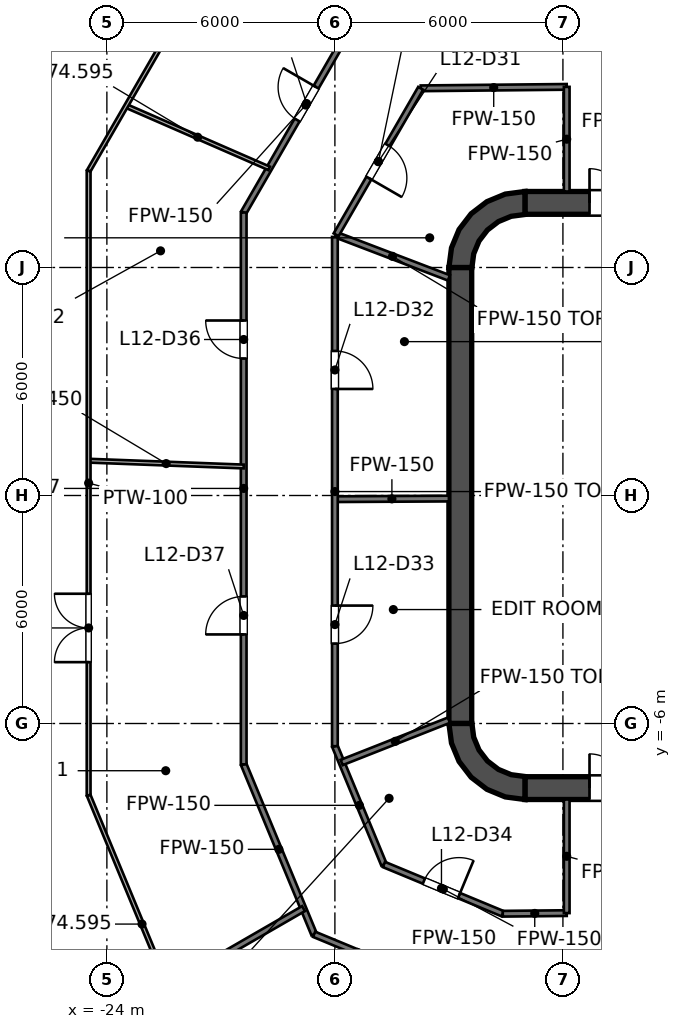
"""IFC4 building model, lengths in metres.
Left out: names, types, materials, properties, quantities, classifications, styles, units other than length and angle.
Written with IfcOpenShell. Run it as: python <this file> out.ifc"""

import sys

from ifc_helpers import new_model, si_unit, direction, frame, frame_2d, origin, place, context, subcontext, project, spatial, polyline, rectangle, outline, extrude, element, fill, save


model = new_model("IFC4")
c1 = context("Model", 3, precision=1e-05, world=origin(), true_north=direction((0.0, 1.0)))
c2 = subcontext(c1, "Body", "Model", "MODEL_VIEW")
j1 = project(units=[si_unit("LENGTHUNIT", "METRE"), si_unit("PLANEANGLEUNIT", "RADIAN")], contexts=[c1])
p1 = place(None, origin())
s1 = spatial("IfcSite", under=j1, at=p1, CompositionType="ELEMENT")
p2 = place(p1, origin())
s2 = spatial("IfcBuilding", under=s1, at=p2, CompositionType="ELEMENT")
p3 = place(p2, frame((0.0, 0.0, 71.4)))
s3 = spatial("IfcBuildingStorey", under=s2, at=p3, CompositionType="ELEMENT", Elevation=71.4)
p4 = place(p3, frame((-13.0, 7.7, 0.0), z_axis=(0.0, 0.0, 1.0), x_axis=(1.0, 0.0, 0.0)))
e1 = element("IfcWall", 1, at=p4, inside=s3, PredefinedType="SHEAR", context=c2, shape_type="SweptSolid", body=[
    extrude(rectangle(XDim=26.0, YDim=0.6, at=frame_2d((13.0, 0.0))), origin(), (0.0, 0.0, 1.0), 4.2),
])
p5 = place(p4, frame((1.7, 0.0, 0.0)))
e2 = element("IfcOpeningElement", 2, at=p5, cuts=e1, PredefinedType="OPENING", context=c2, shape_type="SweptSolid", body=[
    extrude(rectangle(XDim=1.8, YDim=2.1, at=frame_2d((0.9, 1.05))), frame((0.0, 0.3, 0.0), z_axis=(0.0, -1.0, 0.0), x_axis=(1.0, 0.0, 0.0)), (0.0, 0.0, 1.0), 0.6),
])
p6 = place(p4, frame((22.5, 0.0, 0.0)))
e3 = element("IfcOpeningElement", 3, at=p6, cuts=e1, PredefinedType="OPENING", context=c2, shape_type="SweptSolid", body=[
    extrude(rectangle(XDim=1.8, YDim=2.1, at=frame_2d((0.9, 1.05))), frame((0.0, 0.3, 0.0), z_axis=(0.0, -1.0, 0.0), x_axis=(1.0, 0.0, 0.0)), (0.0, 0.0, 1.0), 0.6),
])
p7 = place(p3, frame((-13.0, -7.7, 0.0), z_axis=(0.0, 0.0, 1.0), x_axis=(1.0, 0.0, 0.0)))
e4 = element("IfcWall", 4, at=p7, inside=s3, PredefinedType="SHEAR", context=c2, shape_type="SweptSolid", body=[
    extrude(rectangle(XDim=26.0, YDim=0.6, at=frame_2d((13.0, 0.0))), origin(), (0.0, 0.0, 1.0), 4.2),
])
p8 = place(p7, frame((1.7, 0.0, 0.0)))
e5 = element("IfcOpeningElement", 5, at=p8, cuts=e4, PredefinedType="OPENING", context=c2, shape_type="SweptSolid", body=[
    extrude(rectangle(XDim=1.8, YDim=2.1, at=frame_2d((0.9, 1.05))), frame((0.0, 0.3, 0.0), z_axis=(0.0, -1.0, 0.0), x_axis=(1.0, 0.0, 0.0)), (0.0, 0.0, 1.0), 0.6),
])
p9 = place(p7, frame((22.5, 0.0, 0.0)))
e6 = element("IfcOpeningElement", 6, at=p9, cuts=e4, PredefinedType="OPENING", context=c2, shape_type="SweptSolid", body=[
    extrude(rectangle(XDim=1.8, YDim=2.1, at=frame_2d((0.9, 1.05))), frame((0.0, 0.3, 0.0), z_axis=(0.0, -1.0, 0.0), x_axis=(1.0, 0.0, 0.0)), (0.0, 0.0, 1.0), 0.6),
])
p10 = place(p3, frame((-14.7, -6.0, 0.0), z_axis=(0.0, 0.0, 1.0), x_axis=(0.0, 1.0, 0.0)))
e7 = element("IfcWall", 7, at=p10, inside=s3, PredefinedType="SHEAR", context=c2, shape_type="SweptSolid", body=[
    extrude(rectangle(XDim=12.0, YDim=0.6, at=frame_2d((6.0, 0.0))), origin(), (0.0, 0.0, 1.0), 4.2),
])
p11 = place(p3, origin())
e8 = element("IfcWall", 8, at=p11, inside=s3, PredefinedType="SHEAR", context=c2, shape_type="SweptSolid", body=[
    extrude(outline(polyline([(-15.0, 6.0), (-14.395, 6.0), (-14.347, 6.361), (-14.208, 6.698), (-13.986, 6.986), (-13.698, 7.208), (-13.361, 7.347), (-13.0, 7.395), (-13.0, 8.0), (-13.518, 7.932), (-14.0, 7.732), (-14.414, 7.414), (-14.732, 7.0), (-14.932, 6.518), (-15.0, 6.0)])), origin(), (0.0, 0.0, 1.0), 4.2),
])
e9 = element("IfcWall", 9, at=p11, inside=s3, PredefinedType="SHEAR", context=c2, shape_type="SweptSolid", body=[
    extrude(outline(polyline([(-13.0, -8.0), (-13.0, -7.395), (-13.361, -7.347), (-13.698, -7.208), (-13.986, -6.986), (-14.208, -6.698), (-14.347, -6.361), (-14.395, -6.0), (-15.0, -6.0), (-14.932, -6.518), (-14.732, -7.0), (-14.414, -7.414), (-14.0, -7.732), (-13.518, -7.932), (-13.0, -8.0)])), origin(), (0.0, 0.0, 1.0), 4.2),
])
p12 = place(p3, frame((-11.8, -7.4, 0.0), z_axis=(0.0, 0.0, 1.0), x_axis=(0.0, 1.0, 0.0)))
e10 = element("IfcWall", 10, at=p12, inside=s3, PredefinedType="SOLIDWALL", context=c2, shape_type="SweptSolid", body=[
    extrude(rectangle(XDim=14.8, YDim=0.4, at=frame_2d((7.4, 0.0))), origin(), (0.0, 0.0, 1.0), 4.05),
])
p13 = place(p12, frame((11.2, 0.0, 0.0)))
e11 = element("IfcOpeningElement", 11, at=p13, cuts=e10, PredefinedType="OPENING", context=c2, shape_type="SweptSolid", body=[
    extrude(rectangle(XDim=1.1, YDim=2.1, at=frame_2d((0.55, 1.05))), frame((0.0, 0.2, 0.0), z_axis=(0.0, -1.0, 0.0), x_axis=(1.0, 0.0, 0.0)), (0.0, 0.0, 1.0), 0.4),
])
p14 = place(p12, frame((8.3, 0.0, 0.0)))
e12 = element("IfcOpeningElement", 12, at=p14, cuts=e10, PredefinedType="OPENING", context=c2, shape_type="SweptSolid", body=[
    extrude(rectangle(XDim=1.1, YDim=2.1, at=frame_2d((0.55, 1.05))), frame((0.0, 0.2, 0.0), z_axis=(0.0, -1.0, 0.0), x_axis=(1.0, 0.0, 0.0)), (0.0, 0.0, 1.0), 0.4),
])
p15 = place(p12, frame((5.4, 0.0, 0.0)))
e13 = element("IfcOpeningElement", 13, at=p15, cuts=e10, PredefinedType="OPENING", context=c2, shape_type="SweptSolid", body=[
    extrude(rectangle(XDim=1.1, YDim=2.1, at=frame_2d((0.55, 1.05))), frame((0.0, 0.2, 0.0), z_axis=(0.0, -1.0, 0.0), x_axis=(1.0, 0.0, 0.0)), (0.0, 0.0, 1.0), 0.4),
])
p16 = place(p12, frame((13.552, 0.0, 0.0)))
e14 = element("IfcOpeningElement", 14, at=p16, cuts=e10, PredefinedType="OPENING", context=c2, shape_type="SweptSolid", body=[
    extrude(rectangle(XDim=0.9, YDim=2.1, at=frame_2d((0.45, 1.05))), frame((0.0, 0.2, 0.0), z_axis=(0.0, -1.0, 0.0), x_axis=(1.0, 0.0, 0.0)), (0.0, 0.0, 1.0), 0.4),
])
p17 = place(p12, frame((0.347, 0.0, 0.0)))
e15 = element("IfcOpeningElement", 15, at=p17, cuts=e10, PredefinedType="OPENING", context=c2, shape_type="SweptSolid", body=[
    extrude(rectangle(XDim=0.9, YDim=2.1, at=frame_2d((0.45, 1.05))), frame((0.0, 0.2, 0.0), z_axis=(0.0, -1.0, 0.0), x_axis=(1.0, 0.0, 0.0)), (0.0, 0.0, 1.0), 0.4),
])
e16 = element("IfcWall", 16, at=p11, inside=s3, PredefinedType="SOLIDWALL", context=c2, shape_type="SweptSolid", body=[
    extrude(outline(polyline([(-12.0, -5.925), (-12.0, -5.675), (-14.15, -5.675), (-14.15, -3.025), (-12.0, -3.025), (-12.0, -2.775), (-14.15, -2.775), (-14.15, -0.125), (-12.0, -0.125), (-12.0, 0.125), (-14.15, 0.125), (-14.15, 2.775), (-12.0, 2.775), (-12.0, 3.025), (-14.15, 3.025), (-14.15, 5.675), (-12.0, 5.675), (-12.0, 5.925), (-14.15, 5.925), (-14.4, 5.925), (-14.4, 5.675), (-14.4, 3.025), (-14.4, 2.775), (-14.4, 0.125), (-14.4, -0.125), (-14.4, -2.775), (-14.4, -3.025), (-14.4, -5.675), (-14.4, -5.925), (-14.15, -5.925), (-12.0, -5.925)])), origin(), (0.0, 0.0, 1.0), 4.05),
])
p18 = place(p3, frame((-20.4, -7.075, 0.0), z_axis=(0.0, 0.0, 1.0), x_axis=(0.382745247328, -0.923853925492, 0.0)))
e17 = element("IfcWall", 17, at=p18, inside=s3, PredefinedType="PARTITIONING", context=c2, shape_type="SweptSolid", body=[
    extrude(rectangle(XDim=4.841, YDim=0.15, at=frame_2d((2.42, 0.0))), origin(), (0.0, 0.0, 1.0), 3.195),
])
p19 = place(p3, frame((-18.0, -6.597, 0.0), z_axis=(0.0, 0.0, 1.0), x_axis=(0.382742094492, -0.923855231681, 0.0)))
e18 = element("IfcWall", 18, at=p19, inside=s3, PredefinedType="PARTITIONING", context=c2, shape_type="SweptSolid", body=[
    extrude(rectangle(XDim=3.37, YDim=0.15, at=frame_2d((1.685, 0.0))), origin(), (0.0, 0.0, 1.0), 3.195),
])
p20 = place(p3, frame((-18.547, -11.547, 0.0), z_axis=(0.0, 0.0, 1.0), x_axis=(0.923816952651, -0.382834478587, 0.0)))
e19 = element("IfcWall", 19, at=p20, inside=s3, PredefinedType="PARTITIONING", context=c2, shape_type="SweptSolid", body=[
    extrude(rectangle(XDim=4.869, YDim=0.15, at=frame_2d((2.435, 0.0))), origin(), (0.0, 0.0, 1.0), 3.195),
])
p21 = place(p20, frame((1.207, 0.0, 0.0)))
e20 = element("IfcOpeningElement", 20, at=p21, cuts=e19, PredefinedType="OPENING", context=c2, shape_type="SweptSolid", body=[
    extrude(rectangle(XDim=1.0, YDim=2.1, at=frame_2d((0.5, 1.05))), frame((0.0, 0.075, 0.0), z_axis=(0.0, -1.0, 0.0), x_axis=(1.0, 0.0, 0.0)), (0.0, 0.0, 1.0), 0.15),
])
p22 = place(p3, frame((-16.71, -9.71, 0.0), z_axis=(0.0, 0.0, 1.0), x_axis=(0.923809320732, -0.382852894632, 0.0)))
e21 = element("IfcWall", 21, at=p22, inside=s3, PredefinedType="PARTITIONING", context=c2, shape_type="SweptSolid", body=[
    extrude(rectangle(XDim=3.385, YDim=0.15, at=frame_2d((1.692, 0.0))), origin(), (0.0, 0.0, 1.0), 3.195),
])
p23 = place(p22, frame((1.139, 0.0, 0.0)))
e22 = element("IfcOpeningElement", 22, at=p23, cuts=e21, PredefinedType="OPENING", context=c2, shape_type="SweptSolid", body=[
    extrude(rectangle(XDim=1.0, YDim=2.1, at=frame_2d((0.5, 1.05))), frame((0.0, 0.075, 0.0), z_axis=(0.0, -1.0, 0.0), x_axis=(1.0, 0.0, 0.0)), (0.0, 0.0, 1.0), 0.15),
])
p24 = place(p3, frame((-17.968, 6.86, 0.0), z_axis=(0.0, 0.0, 1.0), x_axis=(0.934237940374, -0.356650348053, 0.0)))
e23 = element("IfcWall", 23, at=p24, inside=s3, PredefinedType="PARTITIONING", context=c2, shape_type="SweptSolid", body=[
    extrude(rectangle(XDim=3.177, YDim=0.15, at=frame_2d((1.588, 0.0))), origin(), (0.0, 0.0, 1.0), 4.05),
])
p25 = place(p3, frame((-18.0, -0.097, 0.0), z_axis=(0.0, 0.0, 1.0), x_axis=(0.999985575988, 0.005371016277, 0.0)))
e24 = element("IfcWall", 24, at=p25, inside=s3, PredefinedType="PARTITIONING", context=c2, shape_type="SweptSolid", body=[
    extrude(rectangle(XDim=3.0, YDim=0.15, at=frame_2d((1.5, 0.0))), origin(), (0.0, 0.0, 1.0), 3.195),
])
p26 = place(p3, frame((-13.583, -11.006, 0.0), z_axis=(0.0, 0.0, 1.0), x_axis=(0.999949916693, 0.010008201951, 0.0)))
e25 = element("IfcWall", 25, at=p26, inside=s3, PredefinedType="PARTITIONING", context=c2, shape_type="SweptSolid", body=[
    extrude(rectangle(XDim=1.683, YDim=0.15, at=frame_2d((0.842, 0.0))), origin(), (0.0, 0.0, 1.0), 4.05),
])
p27 = place(p3, frame((-15.742, 10.715, 0.0), z_axis=(0.0, 0.0, 1.0), x_axis=(0.999950870391, 0.009912456998, 0.0)))
e26 = element("IfcWall", 26, at=p27, inside=s3, PredefinedType="PARTITIONING", context=c2, shape_type="SweptSolid", body=[
    extrude(rectangle(XDim=3.842, YDim=0.15, at=frame_2d((1.921, 0.0))), origin(), (0.0, 0.0, 1.0), 3.195),
])
p28 = place(p3, frame((-17.822, -7.026, 0.0), z_axis=(0.0, 0.0, 1.0), x_axis=(0.930286083334, 0.366834844522, 0.0)))
e27 = element("IfcWall", 27, at=p28, inside=s3, PredefinedType="PARTITIONING", context=c2, shape_type="SweptSolid", body=[
    extrude(rectangle(XDim=3.033, YDim=0.15, at=frame_2d((1.517, 0.0))), origin(), (0.0, 0.0, 1.0), 4.05),
])
p29 = place(p3, frame((-24.703, -14.263, 0.0), z_axis=(0.0, 0.0, 1.0), x_axis=(0.866084930914, 0.499896881811, 0.0)))
e28 = element("IfcWall", 28, at=p29, inside=s3, PredefinedType="PARTITIONING", context=c2, shape_type="SweptSolid", body=[
    extrude(rectangle(XDim=6.785, YDim=0.15, at=frame_2d((3.393, 0.0))), origin(), (0.0, 0.0, 1.0), 3.352),
])
p30 = place(p3, frame((-17.968, 6.86, 0.0), z_axis=(0.0, 0.0, 1.0), x_axis=(0.499985160367, 0.866033971281, 0.0)))
e29 = element("IfcWall", 29, at=p30, inside=s3, PredefinedType="PARTITIONING", context=c2, shape_type="SweptSolid", body=[
    extrude(rectangle(XDim=4.451, YDim=0.15, at=frame_2d((2.226, 0.0))), origin(), (0.0, 0.0, 1.0), 3.195),
])
p31 = place(p30, frame((1.724, 0.0, 0.0)))
e30 = element("IfcOpeningElement", 30, at=p31, cuts=e29, PredefinedType="OPENING", context=c2, shape_type="SweptSolid", body=[
    extrude(rectangle(XDim=1.0, YDim=2.1, at=frame_2d((0.5, 1.05))), frame((0.0, 0.075, 0.0), z_axis=(0.0, -1.0, 0.0), x_axis=(1.0, 0.0, 0.0)), (0.0, 0.0, 1.0), 0.15),
])
p32 = place(p3, frame((-20.4, 7.447, 0.0), z_axis=(0.0, 0.0, 1.0), x_axis=(0.499959831567, 0.866048593798, 0.0)))
e31 = element("IfcWall", 31, at=p32, inside=s3, PredefinedType="PARTITIONING", context=c2, shape_type="SweptSolid", body=[
    extrude(rectangle(XDim=6.529, YDim=0.15, at=frame_2d((3.264, 0.0))), origin(), (0.0, 0.0, 1.0), 3.195),
])
p33 = place(p32, frame((2.811, 0.0, 0.0)))
e32 = element("IfcOpeningElement", 32, at=p33, cuts=e31, PredefinedType="OPENING", context=c2, shape_type="SweptSolid", body=[
    extrude(rectangle(XDim=1.0, YDim=2.1, at=frame_2d((0.5, 1.05))), frame((0.0, 0.075, 0.0), z_axis=(0.0, -1.0, 0.0), x_axis=(1.0, 0.0, 0.0)), (0.0, 0.0, 1.0), 0.15),
])
p34 = place(p3, frame((-11.9, -10.989, 0.0), z_axis=(0.0, 0.0, 1.0), x_axis=(0.0, 1.0, 0.0)))
e33 = element("IfcWall", 33, at=p34, inside=s3, PredefinedType="PARTITIONING", context=c2, shape_type="SweptSolid", body=[
    extrude(rectangle(XDim=2.989, YDim=0.15, at=frame_2d((1.495, 0.0))), origin(), (0.0, 0.0, 1.0), 3.195),
])
p35 = place(p3, frame((-11.9, 8.0, 0.0), z_axis=(0.0, 0.0, 1.0), x_axis=(0.0, 1.0, 0.0)))
e34 = element("IfcWall", 34, at=p35, inside=s3, PredefinedType="PARTITIONING", context=c2, shape_type="SweptSolid", body=[
    extrude(rectangle(XDim=2.753, YDim=0.15, at=frame_2d((1.376, 0.0))), origin(), (0.0, 0.0, 1.0), 3.195),
])
p36 = place(p3, frame((-18.0, -6.597, 0.0), z_axis=(0.0, 0.0, 1.0), x_axis=(0.0, 1.0, 0.0)))
e35 = element("IfcWall", 35, at=p36, inside=s3, PredefinedType="PARTITIONING", context=c2, shape_type="SweptSolid", body=[
    extrude(rectangle(XDim=13.401, YDim=0.15, at=frame_2d((6.7, 0.0))), origin(), (0.0, 0.0, 1.0), 3.127),
])
p37 = place(p36, frame((9.4, 0.0, 0.0)))
e36 = element("IfcOpeningElement", 36, at=p37, cuts=e35, PredefinedType="OPENING", context=c2, shape_type="SweptSolid", body=[
    extrude(rectangle(XDim=1.0, YDim=2.1, at=frame_2d((0.5, 1.05))), frame((0.0, 0.075, 0.0), z_axis=(0.0, -1.0, 0.0), x_axis=(1.0, 0.0, 0.0)), (0.0, 0.0, 1.0), 0.15),
])
p38 = place(p36, frame((2.7, 0.0, 0.0)))
e37 = element("IfcOpeningElement", 37, at=p38, cuts=e35, PredefinedType="OPENING", context=c2, shape_type="SweptSolid", body=[
    extrude(rectangle(XDim=1.0, YDim=2.1, at=frame_2d((0.5, 1.05))), frame((0.0, 0.075, 0.0), z_axis=(0.0, -1.0, 0.0), x_axis=(1.0, 0.0, 0.0)), (0.0, 0.0, 1.0), 0.15),
])
p39 = place(p3, frame((-20.4, -7.075, 0.0), z_axis=(0.0, 0.0, 1.0), x_axis=(0.0, 1.0, 0.0)))
e38 = element("IfcWall", 38, at=p39, inside=s3, PredefinedType="PARTITIONING", context=c2, shape_type="SweptSolid", body=[
    extrude(rectangle(XDim=14.522, YDim=0.15, at=frame_2d((7.261, 0.0))), origin(), (0.0, 0.0, 1.0), 3.127),
])
p40 = place(p39, frame((10.68, 0.0, 0.0)))
e39 = element("IfcOpeningElement", 39, at=p40, cuts=e38, PredefinedType="OPENING", context=c2, shape_type="SweptSolid", body=[
    extrude(rectangle(XDim=1.0, YDim=2.1, at=frame_2d((0.5, 1.05))), frame((0.0, 0.075, 0.0), z_axis=(0.0, -1.0, 0.0), x_axis=(1.0, 0.0, 0.0)), (0.0, 0.0, 1.0), 0.15),
])
p41 = place(p39, frame((3.419, 0.0, 0.0)))
e40 = element("IfcOpeningElement", 40, at=p41, cuts=e38, PredefinedType="OPENING", context=c2, shape_type="SweptSolid", body=[
    extrude(rectangle(XDim=1.0, YDim=2.1, at=frame_2d((0.5, 1.05))), frame((0.0, 0.075, 0.0), z_axis=(0.0, -1.0, 0.0), x_axis=(1.0, 0.0, 0.0)), (0.0, 0.0, 1.0), 0.15),
])
p42 = place(p3, frame((-24.48, -7.887, 0.0), z_axis=(0.0, 0.0, 1.0), x_axis=(0.382715997849, -0.923866042774, 0.0)))
e41 = element("IfcWall", 41, at=p42, inside=s3, PredefinedType="PARTITIONING", context=c2, shape_type="SweptSolid", body=[
    extrude(rectangle(XDim=7.341, YDim=0.1, at=frame_2d((3.67, 0.0))), origin(), (0.0, 0.0, 1.0), 3.195),
])
p43 = place(p3, frame((-23.493, 10.25, 0.0), z_axis=(0.0, 0.0, 1.0), x_axis=(0.916532244419, -0.399960804254, 0.0)))
e42 = element("IfcWall", 42, at=p43, inside=s3, PredefinedType="PARTITIONING", context=c2, shape_type="SweptSolid", body=[
    extrude(rectangle(XDim=4.106, YDim=0.1, at=frame_2d((2.053, 0.0))), origin(), (0.0, 0.0, 1.0), 3.195),
])
p44 = place(p3, frame((-24.48, 0.916, 0.0), z_axis=(0.0, 0.0, 1.0), x_axis=(0.999296943798, -0.037491573945, 0.0)))
e43 = element("IfcWall", 43, at=p44, inside=s3, PredefinedType="PARTITIONING", context=c2, shape_type="SweptSolid", body=[
    extrude(rectangle(XDim=4.083, YDim=0.1, at=frame_2d((2.042, 0.0))), origin(), (0.0, 0.0, 1.0), 4.05),
])
p45 = place(p3, frame((-24.48, 8.54, 0.0), z_axis=(0.0, 0.0, 1.0), x_axis=(0.499991453095, 0.866030338286, 0.0)))
e44 = element("IfcWall", 44, at=p45, inside=s3, PredefinedType="PARTITIONING", context=c2, shape_type="SweptSolid", body=[
    extrude(rectangle(XDim=9.951, YDim=0.1, at=frame_2d((4.976, 0.0))), origin(), (0.0, 0.0, 1.0), 3.195),
])
p46 = place(p3, frame((-24.48, -7.887, 0.0), z_axis=(0.0, 0.0, 1.0), x_axis=(0.0, 1.0, 0.0)))
e45 = element("IfcWall", 45, at=p46, inside=s3, PredefinedType="PARTITIONING", context=c2, shape_type="SweptSolid", body=[
    extrude(rectangle(XDim=16.427, YDim=0.1, at=frame_2d((8.213, 0.0))), origin(), (0.0, 0.0, 1.0), 3.127),
])
p47 = place(p46, frame((3.501, 0.0, 0.0)))
e46 = element("IfcOpeningElement", 46, at=p47, cuts=e45, PredefinedType="OPENING", context=c2, shape_type="SweptSolid", body=[
    extrude(rectangle(XDim=1.8, YDim=2.1, at=frame_2d((0.9, 1.05))), frame((0.0, 0.05, 0.0), z_axis=(0.0, -1.0, 0.0), x_axis=(1.0, 0.0, 0.0)), (0.0, 0.0, 1.0), 0.1),
])
p48 = place(p13, origin())
e47 = element("IfcDoor", 47, at=p48, inside=s3, OperationType="DOUBLE_DOOR_SLIDING", PredefinedType="DOOR", context=c2, shape_type="SweptSolid", body=[
    extrude(rectangle(XDim=1.1, YDim=2.1, at=frame_2d((0.55, 1.05))), frame((0.0, 0.025, 0.0), z_axis=(0.0, -1.0, 0.0), x_axis=(1.0, 0.0, 0.0)), (0.0, 0.0, 1.0), 0.05),
])
fill(e11, e47)
p49 = place(p14, origin())
e48 = element("IfcDoor", 48, at=p49, inside=s3, OperationType="DOUBLE_DOOR_SLIDING", PredefinedType="DOOR", context=c2, shape_type="SweptSolid", body=[
    extrude(rectangle(XDim=1.1, YDim=2.1, at=frame_2d((0.55, 1.05))), frame((0.0, 0.025, 0.0), z_axis=(0.0, -1.0, 0.0), x_axis=(1.0, 0.0, 0.0)), (0.0, 0.0, 1.0), 0.05),
])
fill(e12, e48)
p50 = place(p15, origin())
e49 = element("IfcDoor", 49, at=p50, inside=s3, OperationType="DOUBLE_DOOR_SLIDING", PredefinedType="DOOR", context=c2, shape_type="SweptSolid", body=[
    extrude(rectangle(XDim=1.1, YDim=2.1, at=frame_2d((0.55, 1.05))), frame((0.0, 0.025, 0.0), z_axis=(0.0, -1.0, 0.0), x_axis=(1.0, 0.0, 0.0)), (0.0, 0.0, 1.0), 0.05),
])
fill(e13, e49)
p51 = place(p16, origin())
e50 = element("IfcDoor", 50, at=p51, inside=s3, OperationType="SINGLE_SWING_LEFT", PredefinedType="DOOR", context=c2, shape_type="SweptSolid", body=[
    extrude(rectangle(XDim=0.9, YDim=2.1, at=frame_2d((0.45, 1.05))), frame((0.0, 0.025, 0.0), z_axis=(0.0, -1.0, 0.0), x_axis=(1.0, 0.0, 0.0)), (0.0, 0.0, 1.0), 0.05),
])
fill(e14, e50)
p52 = place(p17, origin())
e51 = element("IfcDoor", 51, at=p52, inside=s3, OperationType="SINGLE_SWING_LEFT", PredefinedType="DOOR", context=c2, shape_type="SweptSolid", body=[
    extrude(rectangle(XDim=0.9, YDim=2.1, at=frame_2d((0.45, 1.05))), frame((0.0, 0.025, 0.0), z_axis=(0.0, -1.0, 0.0), x_axis=(1.0, 0.0, 0.0)), (0.0, 0.0, 1.0), 0.05),
])
fill(e15, e51)
p53 = place(p5, origin())
e52 = element("IfcDoor", 52, at=p53, inside=s3, OperationType="DOUBLE_DOOR_SINGLE_SWING", PredefinedType="DOOR", context=c2, shape_type="SweptSolid", body=[
    extrude(rectangle(XDim=1.8, YDim=2.1, at=frame_2d((0.9, 1.05))), frame((0.0, 0.025, 0.0), z_axis=(0.0, -1.0, 0.0), x_axis=(1.0, 0.0, 0.0)), (0.0, 0.0, 1.0), 0.05),
])
fill(e2, e52)
p54 = place(p8, origin())
e53 = element("IfcDoor", 53, at=p54, inside=s3, OperationType="DOUBLE_DOOR_SINGLE_SWING", PredefinedType="DOOR", context=c2, shape_type="SweptSolid", body=[
    extrude(rectangle(XDim=1.8, YDim=2.1, at=frame_2d((0.9, 1.05))), frame((0.0, 0.025, 0.0), z_axis=(0.0, -1.0, 0.0), x_axis=(1.0, 0.0, 0.0)), (0.0, 0.0, 1.0), 0.05),
])
fill(e5, e53)
p55 = place(p31, origin())
e54 = element("IfcDoor", 54, at=p55, inside=s3, OperationType="SINGLE_SWING_LEFT", PredefinedType="DOOR", context=c2, shape_type="SweptSolid", body=[
    extrude(rectangle(XDim=1.0, YDim=2.1, at=frame_2d((0.5, 1.05))), frame((0.0, 0.025, 0.0), z_axis=(0.0, -1.0, 0.0), x_axis=(1.0, 0.0, 0.0)), (0.0, 0.0, 1.0), 0.05),
])
fill(e30, e54)
p56 = place(p37, origin())
e55 = element("IfcDoor", 55, at=p56, inside=s3, OperationType="SINGLE_SWING_LEFT", PredefinedType="DOOR", context=c2, shape_type="SweptSolid", body=[
    extrude(rectangle(XDim=1.0, YDim=2.1, at=frame_2d((0.5, 1.05))), frame((0.0, 0.025, 0.0), z_axis=(0.0, -1.0, 0.0), x_axis=(1.0, 0.0, 0.0)), (0.0, 0.0, 1.0), 0.05),
])
fill(e36, e55)
p57 = place(p38, origin())
e56 = element("IfcDoor", 56, at=p57, inside=s3, OperationType="SINGLE_SWING_RIGHT", PredefinedType="DOOR", context=c2, shape_type="SweptSolid", body=[
    extrude(rectangle(XDim=1.0, YDim=2.1, at=frame_2d((0.5, 1.05))), frame((0.0, 0.025, 0.0), z_axis=(0.0, -1.0, 0.0), x_axis=(1.0, 0.0, 0.0)), (0.0, 0.0, 1.0), 0.05),
])
fill(e37, e56)
p58 = place(p23, origin())
e57 = element("IfcDoor", 57, at=p58, inside=s3, OperationType="SINGLE_SWING_RIGHT", PredefinedType="DOOR", context=c2, shape_type="SweptSolid", body=[
    extrude(rectangle(XDim=1.0, YDim=2.1, at=frame_2d((0.5, 1.05))), frame((0.0, 0.025, 0.0), z_axis=(0.0, -1.0, 0.0), x_axis=(1.0, 0.0, 0.0)), (0.0, 0.0, 1.0), 0.05),
])
fill(e22, e57)
p59 = place(p33, origin())
e58 = element("IfcDoor", 58, at=p59, inside=s3, OperationType="SINGLE_SWING_RIGHT", PredefinedType="DOOR", context=c2, shape_type="SweptSolid", body=[
    extrude(rectangle(XDim=1.0, YDim=2.1, at=frame_2d((0.5, 1.05))), frame((0.0, 0.025, 0.0), z_axis=(0.0, -1.0, 0.0), x_axis=(1.0, 0.0, 0.0)), (0.0, 0.0, 1.0), 0.05),
])
fill(e32, e58)
p60 = place(p40, origin())
e59 = element("IfcDoor", 59, at=p60, inside=s3, OperationType="SINGLE_SWING_RIGHT", PredefinedType="DOOR", context=c2, shape_type="SweptSolid", body=[
    extrude(rectangle(XDim=1.0, YDim=2.1, at=frame_2d((0.5, 1.05))), frame((0.0, 0.025, 0.0), z_axis=(0.0, -1.0, 0.0), x_axis=(1.0, 0.0, 0.0)), (0.0, 0.0, 1.0), 0.05),
])
fill(e39, e59)
p61 = place(p41, origin())
e60 = element("IfcDoor", 60, at=p61, inside=s3, OperationType="SINGLE_SWING_LEFT", PredefinedType="DOOR", context=c2, shape_type="SweptSolid", body=[
    extrude(rectangle(XDim=1.0, YDim=2.1, at=frame_2d((0.5, 1.05))), frame((0.0, 0.025, 0.0), z_axis=(0.0, -1.0, 0.0), x_axis=(1.0, 0.0, 0.0)), (0.0, 0.0, 1.0), 0.05),
])
fill(e40, e60)
p62 = place(p47, origin())
e61 = element("IfcDoor", 61, at=p62, inside=s3, OperationType="DOUBLE_DOOR_SINGLE_SWING", PredefinedType="DOOR", context=c2, shape_type="SweptSolid", body=[
    extrude(rectangle(XDim=1.8, YDim=2.1, at=frame_2d((0.9, 1.05))), frame((0.0, 0.025, 0.0), z_axis=(0.0, -1.0, 0.0), x_axis=(1.0, 0.0, 0.0)), (0.0, 0.0, 1.0), 0.05),
])
fill(e46, e61)
save(model, sys.argv[1])
